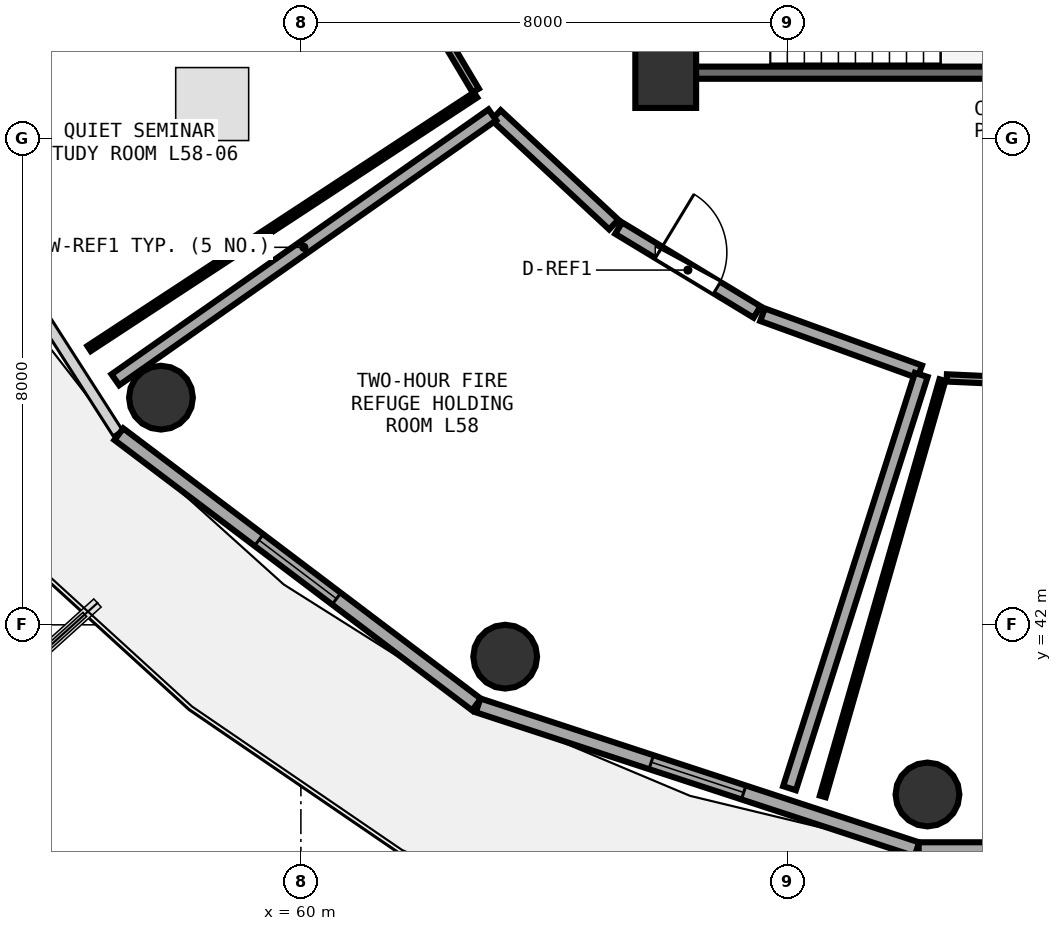
"""IFC4 building model, lengths in metres.
Left out: names, types, materials, properties, quantities, classifications, styles, units other than length and angle.
Written with IfcOpenShell. Run it as: python <this file> out.ifc"""

import sys

from ifc_helpers import new_model, si_unit, direction, frame, frame_2d, origin, origin_2d, place, context, subcontext, project, spatial, rectangle, circle, extrude, element, fill, save


model = new_model("IFC4")
c1 = context("Model", 3, precision=1e-05, world=origin(), true_north=direction((0.0, 1.0)))
c2 = subcontext(c1, "Body", "Model", "MODEL_VIEW")
j1 = project(units=[si_unit("LENGTHUNIT", "METRE"), si_unit("PLANEANGLEUNIT", "RADIAN")], contexts=[c1])
p1 = place(None, origin())
s1 = spatial("IfcSite", under=j1, at=p1, CompositionType="ELEMENT")
p2 = place(p1, origin())
s2 = spatial("IfcBuilding", under=s1, at=p2, CompositionType="ELEMENT")
p3 = place(p2, frame((0.0, 0.0, 226.95)))
s3 = spatial("IfcBuildingStorey", under=s2, at=p3, CompositionType="ELEMENT", Elevation=226.95)
p4 = place(p3, frame((66.0, 51.0, 0.0), z_axis=(0.0, 0.0, 1.0), x_axis=(1.0, 0.0, 0.0)))
e1 = element("IfcColumn", 1, at=p4, inside=s3, PredefinedType="PILASTER", context=c2, shape_type="SweptSolid", body=[
    extrude(rectangle(XDim=1.0, YDim=1.0, at=origin_2d()), origin(), (0.0, 0.0, 1.0), 3.75),
])
for number, where, z_axis, x_axis in (
    (2, (57.698, 45.736, 0.0), (0.0, 0.0, 1.0), (1.0, 0.0, 0.0)),
    (3, (63.36, 41.476, 0.0), (0.0, 0.0, 1.0), (1.0, 0.0, 0.0)),
    (4, (70.305, 39.21, 0.0), (0.0, 0.0, 1.0), (1.0, 0.0, 0.0)),
):
    element("IfcColumn", number, at=place(p3, frame(where, z_axis=z_axis, x_axis=x_axis)), inside=s3, PredefinedType="COLUMN", context=c2, shape_type="SweptSolid", body=[
        extrude(circle(Radius=0.525, at=origin_2d()), origin(), (0.0, 0.0, 1.0), 3.75),
    ])
p5 = place(p3, frame((57.006, 45.135, 0.0), z_axis=(0.0, 0.0, 1.0), x_axis=(0.797701674595, -0.603052268338, 0.0)))
e5 = element("IfcWall", 5, at=p5, inside=s3, PredefinedType="SOLIDWALL", context=c2, shape_type="SweptSolid", body=[
    extrude(rectangle(XDim=7.374, YDim=0.24, at=frame_2d((3.687, 0.0))), origin(), (0.0, 0.0, 1.0), 3.475),
])
p6 = place(p5, frame((2.887, 0.0, 0.85)))
e6 = element("IfcOpeningElement", 6, at=p6, cuts=e5, PredefinedType="OPENING", context=c2, shape_type="SweptSolid", body=[
    extrude(rectangle(XDim=1.6, YDim=1.45, at=frame_2d((0.8, 0.725))), frame((0.0, 0.13, 0.0), z_axis=(0.0, -1.0, 0.0), x_axis=(1.0, 0.0, 0.0)), (0.0, 0.0, 1.0), 0.26),
])
p7 = place(p3, frame((62.914, 40.675, 0.0), z_axis=(0.0, 0.0, 1.0), x_axis=(0.95022142767, -0.31157541366, 0.0)))
e7 = element("IfcWall", 7, at=p7, inside=s3, PredefinedType="SOLIDWALL", context=c2, shape_type="SweptSolid", body=[
    extrude(rectangle(XDim=7.594, YDim=0.24, at=frame_2d((3.797, 0.0))), origin(), (0.0, 0.0, 1.0), 3.475),
])
p8 = place(p7, frame((2.997, 0.0, 0.85)))
e8 = element("IfcOpeningElement", 8, at=p8, cuts=e7, PredefinedType="OPENING", context=c2, shape_type="SweptSolid", body=[
    extrude(rectangle(XDim=1.6, YDim=1.45, at=frame_2d((0.8, 0.725))), frame((0.0, 0.13, 0.0), z_axis=(0.0, -1.0, 0.0), x_axis=(1.0, 0.0, 0.0)), (0.0, 0.0, 1.0), 0.26),
])
p9 = place(p3, frame((70.16, 38.304, 0.0), z_axis=(0.0, 0.0, 1.0), x_axis=(1.0, 0.0, 0.0)))
e9 = element("IfcWall", 9, at=p9, inside=s3, PredefinedType="SOLIDWALL", context=c2, shape_type="SweptSolid", body=[
    extrude(rectangle(XDim=7.68, YDim=0.24, at=frame_2d((3.84, 0.0))), origin(), (0.0, 0.0, 1.0), 3.475),
])
p10 = place(p9, frame((3.04, 0.0, 0.85)))
e10 = element("IfcOpeningElement", 10, at=p10, cuts=e9, PredefinedType="OPENING", context=c2, shape_type="SweptSolid", body=[
    extrude(rectangle(XDim=1.6, YDim=1.45, at=frame_2d((0.8, 0.725))), frame((0.0, 0.13, 0.0), z_axis=(0.0, -1.0, 0.0), x_axis=(1.0, 0.0, 0.0)), (0.0, 0.0, 1.0), 0.26),
])
p11 = place(p3, frame((66.26, 51.08, 0.0), z_axis=(0.0, 0.0, 1.0), x_axis=(1.0, 0.0, 0.0)))
e11 = element("IfcWall", 11, at=p11, inside=s3, PredefinedType="SHEAR", context=c2, shape_type="SweptSolid", body=[
    extrude(rectangle(XDim=7.16, YDim=0.2, at=frame_2d((3.58, 0.0))), origin(), (0.0, 0.0, 1.0), 3.49),
])
p12 = place(p3, frame((66.14, 54.27, 0.0), z_axis=(0.0, 0.0, 1.0), x_axis=(0.0, -1.0, 0.0)))
e12 = element("IfcWall", 12, at=p12, inside=s3, PredefinedType="SHEAR", context=c2, shape_type="SweptSolid", body=[
    extrude(rectangle(XDim=3.07, YDim=0.2, at=frame_2d((1.535, 0.0))), origin(), (0.0, 0.0, 1.0), 3.49),
])
p13 = place(p12, frame((1.01, 0.0, 0.0)))
e13 = element("IfcOpeningElement", 13, at=p13, cuts=e12, PredefinedType="OPENING", context=c2, shape_type="SweptSolid", body=[
    extrude(rectangle(XDim=1.05, YDim=2.1, at=frame_2d((0.525, 1.05))), frame((0.0, 0.11, 0.0), z_axis=(0.0, -1.0, 0.0), x_axis=(1.0, 0.0, 0.0)), (0.0, 0.0, 1.0), 0.22),
])
p14 = place(p3, frame((65.226, 48.524, 0.0), z_axis=(0.0, 0.0, 1.0), x_axis=(0.855153479855, -0.518374889333, 0.0)))
e14 = element("IfcWall", 14, at=p14, inside=s3, PredefinedType="SOLIDWALL", context=c2, shape_type="SweptSolid", body=[
    extrude(rectangle(XDim=2.662, YDim=0.22, at=frame_2d((1.331, 0.0))), origin(), (0.0, 0.0, 1.0), 3.025),
])
p15 = place(p14, frame((0.771, 0.0, 0.0)))
e15 = element("IfcOpeningElement", 15, at=p15, cuts=e14, PredefinedType="OPENING", context=c2, shape_type="SweptSolid", body=[
    extrude(rectangle(XDim=1.12, YDim=2.1, at=frame_2d((0.56, 1.05))), frame((0.0, 0.12, 0.0), z_axis=(0.0, -1.0, 0.0), x_axis=(1.0, 0.0, 0.0)), (0.0, 0.0, 1.0), 0.24),
])
p16 = place(p3, frame((70.622, 46.06, 0.0), z_axis=(0.0, 0.0, 1.0), x_axis=(0.998988600078, -0.044964173674, 0.0)))
e16 = element("IfcWall", 16, at=p16, inside=s3, PredefinedType="PARTITIONING", context=c2, shape_type="SweptSolid", body=[
    extrude(rectangle(XDim=5.419, YDim=0.12, at=frame_2d((2.709, 0.0))), origin(), (0.0, 0.0, 1.0), 3.025),
])
p17 = place(p16, frame((2.259, 0.0, 0.0)))
e17 = element("IfcOpeningElement", 17, at=p17, cuts=e16, PredefinedType="OPENING", context=c2, shape_type="SweptSolid", body=[
    extrude(rectangle(XDim=0.9, YDim=2.08, at=frame_2d((0.45, 1.04))), frame((0.0, 0.07, 0.0), z_axis=(0.0, -1.0, 0.0), x_axis=(1.0, 0.0, 0.0)), (0.0, 0.0, 1.0), 0.14),
])
p18 = place(p3, frame((61.148, 53.685, 0.0), z_axis=(0.0, 0.0, 1.0), x_axis=(0.5120460613, -0.858957991468, 0.0)))
e18 = element("IfcWall", 18, at=p18, inside=s3, PredefinedType="PARTITIONING", context=c2, shape_type="SweptSolid", body=[
    extrude(rectangle(XDim=3.374, YDim=0.12, at=frame_2d((1.687, 0.0))), origin(), (0.0, 0.0, 1.0), 3.025),
])
p19 = place(p18, frame((1.237, 0.0, 0.0)))
e19 = element("IfcOpeningElement", 19, at=p19, cuts=e18, PredefinedType="OPENING", context=c2, shape_type="SweptSolid", body=[
    extrude(rectangle(XDim=0.9, YDim=2.08, at=frame_2d((0.45, 1.04))), frame((0.0, 0.07, 0.0), z_axis=(0.0, -1.0, 0.0), x_axis=(1.0, 0.0, 0.0)), (0.0, 0.0, 1.0), 0.14),
])
p20 = place(p3, frame((63.21, 50.382, 0.0), z_axis=(0.0, 0.0, 1.0), x_axis=(0.732365628242, -0.680911584987, 0.0)))
e20 = element("IfcWall", 20, at=p20, inside=s3, PredefinedType="SOLIDWALL", context=c2, shape_type="SweptSolid", body=[
    extrude(rectangle(XDim=2.643, YDim=0.22, at=frame_2d((1.321, 0.0))), origin(), (0.0, 0.0, 1.0), 3.025),
])
p21 = place(p3, frame((67.592, 47.099, 0.0), z_axis=(0.0, 0.0, 1.0), x_axis=(0.940096246947, -0.340909146953, 0.0)))
e21 = element("IfcWall", 21, at=p21, inside=s3, PredefinedType="SOLIDWALL", context=c2, shape_type="SweptSolid", body=[
    extrude(rectangle(XDim=2.751, YDim=0.22, at=frame_2d((1.375, 0.0))), origin(), (0.0, 0.0, 1.0), 3.235),
])
p22 = place(p3, frame((70.203, 46.11, 0.0), z_axis=(0.0, 0.0, 1.0), x_axis=(-0.303726261943, -0.952759338871, 0.0)))
e22 = element("IfcWall", 22, at=p22, inside=s3, PredefinedType="SOLIDWALL", context=c2, shape_type="SweptSolid", body=[
    extrude(rectangle(XDim=7.134, YDim=0.22, at=frame_2d((3.567, 0.0))), origin(), (0.0, 0.0, 1.0), 3.075),
])
p23 = place(p3, frame((56.949, 46.03, 0.0), z_axis=(0.0, 0.0, 1.0), x_axis=(0.818217914941, 0.574908204559, 0.0)))
e23 = element("IfcWall", 23, at=p23, inside=s3, PredefinedType="SOLIDWALL", context=c2, shape_type="SweptSolid", body=[
    extrude(rectangle(XDim=7.577, YDim=0.22, at=frame_2d((3.789, 0.0))), origin(), (0.0, 0.0, 1.0), 3.075),
])
p24 = place(p3, frame((68.583, 39.178, 0.0), z_axis=(0.0, 0.0, 1.0), x_axis=(0.27624173688, 0.961088186799, 0.0)))
e24 = element("IfcWall", 24, at=p24, inside=s3, PredefinedType="PARTITIONING", context=c2, shape_type="SweptSolid", body=[
    extrude(rectangle(XDim=7.123, YDim=0.1, at=frame_2d((3.562, 0.0))), origin(), (0.0, 0.0, 1.0), 3.075),
])
p25 = place(p3, frame((62.873, 50.713, 0.0), z_axis=(0.0, 0.0, 1.0), x_axis=(-0.836172653235, -0.548466310708, 0.0)))
e25 = element("IfcWall", 25, at=p25, inside=s3, PredefinedType="PARTITIONING", context=c2, shape_type="SweptSolid", body=[
    extrude(rectangle(XDim=7.602, YDim=0.1, at=frame_2d((3.801, 0.0))), origin(), (0.0, 0.0, 1.0), 3.075),
])
p26 = place(p6, origin())
e26 = element("IfcWindow", 26, at=p26, inside=s3, PartitioningType="SINGLE_PANEL", PredefinedType="WINDOW", context=c2, shape_type="SweptSolid", body=[
    extrude(rectangle(XDim=1.6, YDim=1.45, at=frame_2d((0.8, 0.725))), frame((0.0, 0.03, 0.0), z_axis=(0.0, -1.0, 0.0), x_axis=(1.0, 0.0, 0.0)), (0.0, 0.0, 1.0), 0.06),
])
fill(e6, e26)
p27 = place(p8, origin())
e27 = element("IfcWindow", 27, at=p27, inside=s3, PartitioningType="SINGLE_PANEL", PredefinedType="WINDOW", context=c2, shape_type="SweptSolid", body=[
    extrude(rectangle(XDim=1.6, YDim=1.45, at=frame_2d((0.8, 0.725))), frame((0.0, 0.03, 0.0), z_axis=(0.0, -1.0, 0.0), x_axis=(1.0, 0.0, 0.0)), (0.0, 0.0, 1.0), 0.06),
])
fill(e8, e27)
p28 = place(p15, origin())
e28 = element("IfcDoor", 28, at=p28, inside=s3, OperationType="SINGLE_SWING_LEFT", PredefinedType="DOOR", context=c2, shape_type="SweptSolid", body=[
    extrude(rectangle(XDim=1.12, YDim=2.1, at=frame_2d((0.56, 1.05))), frame((0.0, 0.025, 0.0), z_axis=(0.0, -1.0, 0.0), x_axis=(1.0, 0.0, 0.0)), (0.0, 0.0, 1.0), 0.05),
])
fill(e15, e28)
save(model, sys.argv[1])
